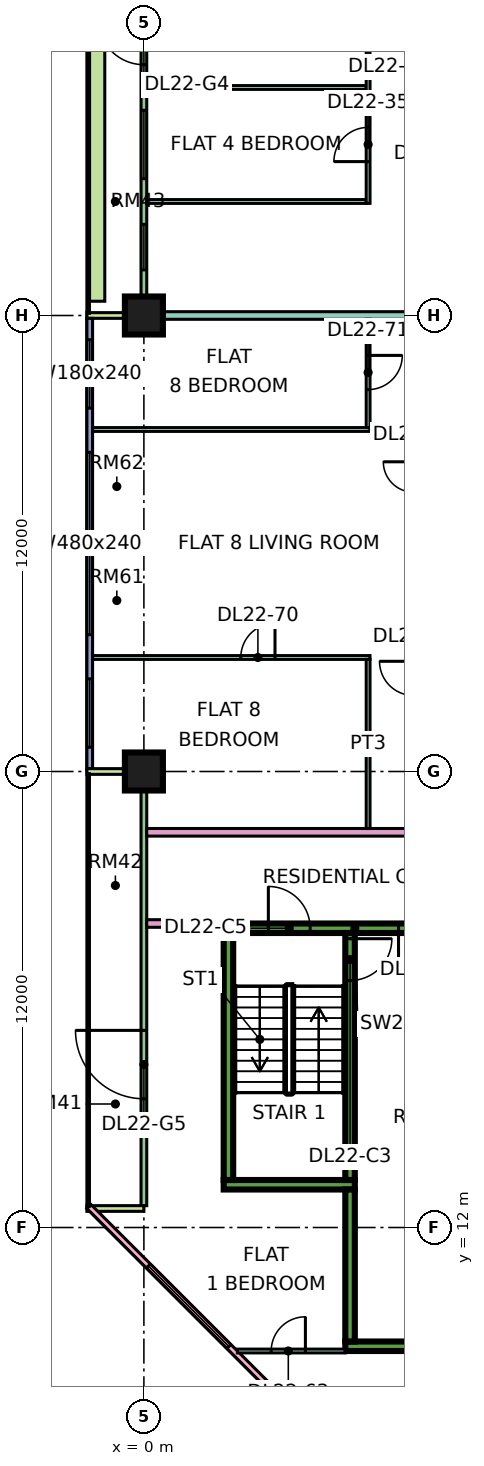
"""IFC4 building model, lengths in metres.
Left out: names, types, materials, properties, quantities, classifications, styles, units other than length and angle.
Written with IfcOpenShell. Run it as: python <this file> out.ifc"""

import sys

from ifc_helpers import new_model, si_unit, direction, frame, frame_2d, origin, origin_2d, place, context, subcontext, project, spatial, rectangle, extrude, element, fill, save


model = new_model("IFC4")
c1 = context("Model", 3, precision=1e-05, world=origin(), true_north=direction((0.0, 1.0)))
c2 = subcontext(c1, "Body", "Model", "MODEL_VIEW")
j1 = project(units=[si_unit("LENGTHUNIT", "METRE"), si_unit("PLANEANGLEUNIT", "RADIAN")], contexts=[c1])
p1 = place(None, origin())
s1 = spatial("IfcSite", under=j1, at=p1, CompositionType="ELEMENT")
p2 = place(p1, origin())
s2 = spatial("IfcBuilding", under=s1, at=p2, CompositionType="ELEMENT")
p3 = place(p2, frame((0.0, 0.0, 99.4)))
s3 = spatial("IfcBuildingStorey", under=s2, at=p3, CompositionType="ELEMENT", Elevation=99.4)
p4 = place(p3, frame((0.0, 24.0, 0.0), z_axis=(0.0, 0.0, 1.0), x_axis=(1.0, 0.0, 0.0)))
e1 = element("IfcColumn", 1, at=p4, inside=s3, PredefinedType="COLUMN", context=c2, shape_type="SweptSolid", body=[
    extrude(rectangle(XDim=1.0, YDim=1.0, at=origin_2d()), origin(), (0.0, 0.0, 1.0), 3.75),
])
p5 = place(p3, frame((0.0, 36.0, 0.0), z_axis=(0.0, 0.0, 1.0), x_axis=(1.0, 0.0, 0.0)))
e2 = element("IfcColumn", 2, at=p5, inside=s3, PredefinedType="COLUMN", context=c2, shape_type="SweptSolid", body=[
    extrude(rectangle(XDim=1.0, YDim=1.0, at=origin_2d()), origin(), (0.0, 0.0, 1.0), 3.75),
])
p6 = place(p3, frame((2.1, 19.875, 0.0), z_axis=(0.0, 0.0, 1.0), x_axis=(1.0, 0.0, 0.0)))
e3 = element("IfcWall", 3, at=p6, inside=s3, PredefinedType="SHEAR", context=c2, shape_type="SweptSolid", body=[
    extrude(rectangle(XDim=6.9, YDim=0.25, at=frame_2d((3.45, 0.0))), origin(), (0.0, 0.0, 1.0), 3.75),
])
p7 = place(p6, frame((1.175, 0.0, 0.0)))
e4 = element("IfcOpeningElement", 4, at=p7, cuts=e3, PredefinedType="OPENING", context=c2, shape_type="SweptSolid", body=[
    extrude(rectangle(XDim=1.1, YDim=2.2, at=frame_2d((0.55, 1.1))), frame((0.0, 0.135, 0.0), z_axis=(0.0, -1.0, 0.0), x_axis=(1.0, 0.0, 0.0)), (0.0, 0.0, 1.0), 0.27),
])
p8 = place(p6, frame((4.6, 0.0, 0.0)))
e5 = element("IfcOpeningElement", 5, at=p8, cuts=e3, PredefinedType="OPENING", context=c2, shape_type="SweptSolid", body=[
    extrude(rectangle(XDim=1.2, YDim=2.2, at=frame_2d((0.6, 1.1))), frame((0.0, 0.135, 0.0), z_axis=(0.0, -1.0, 0.0), x_axis=(1.0, 0.0, 0.0)), (0.0, 0.0, 1.0), 0.27),
])
p9 = place(p3, frame((2.1, 13.125, 0.0), z_axis=(0.0, 0.0, 1.0), x_axis=(1.0, 0.0, 0.0)))
e6 = element("IfcWall", 6, at=p9, inside=s3, PredefinedType="SHEAR", context=c2, shape_type="SweptSolid", body=[
    extrude(rectangle(XDim=3.45, YDim=0.25, at=frame_2d((1.725, 0.0))), origin(), (0.0, 0.0, 1.0), 3.75),
])
p10 = place(p3, frame((2.225, 13.25, 0.0), z_axis=(0.0, 0.0, 1.0), x_axis=(0.0, 1.0, 0.0)))
e7 = element("IfcWall", 7, at=p10, inside=s3, PredefinedType="SHEAR", context=c2, shape_type="SweptSolid", body=[
    extrude(rectangle(XDim=6.5, YDim=0.25, at=frame_2d((3.25, 0.0))), origin(), (0.0, 0.0, 1.0), 3.75),
])
p11 = place(p3, frame((5.425, 13.25, 0.0), z_axis=(0.0, 0.0, 1.0), x_axis=(0.0, 1.0, 0.0)))
e8 = element("IfcWall", 8, at=p11, inside=s3, PredefinedType="SHEAR", context=c2, shape_type="SweptSolid", body=[
    extrude(rectangle(XDim=6.5, YDim=0.25, at=frame_2d((3.25, 0.0))), origin(), (0.0, 0.0, 1.0), 3.75),
])
p12 = place(p11, frame((5.25, 0.0, 0.0)))
e9 = element("IfcOpeningElement", 9, at=p12, cuts=e8, PredefinedType="OPENING", context=c2, shape_type="SweptSolid", body=[
    extrude(rectangle(XDim=1.1, YDim=2.2, at=frame_2d((0.55, 1.1))), frame((0.0, 0.135, 0.0), z_axis=(0.0, -1.0, 0.0), x_axis=(1.0, 0.0, 0.0)), (0.0, 0.0, 1.0), 0.27),
])
p13 = place(p3, frame((5.3, 8.875, 0.0), z_axis=(0.0, 0.0, 1.0), x_axis=(1.0, 0.0, 0.0)))
e10 = element("IfcWall", 10, at=p13, inside=s3, PredefinedType="SHEAR", context=c2, shape_type="SweptSolid", body=[
    extrude(rectangle(XDim=3.7, YDim=0.25, at=frame_2d((1.85, 0.0))), origin(), (0.0, 0.0, 1.0), 3.75),
])
p14 = place(p3, frame((5.425, 9.0, 0.0), z_axis=(0.0, 0.0, 1.0), x_axis=(0.0, 1.0, 0.0)))
e11 = element("IfcWall", 11, at=p14, inside=s3, PredefinedType="SHEAR", context=c2, shape_type="SweptSolid", body=[
    extrude(rectangle(XDim=4.0, YDim=0.25, at=frame_2d((2.0, 0.0))), origin(), (0.0, 0.0, 1.0), 3.75),
])
p15 = place(p3, frame((0.0, 47.925, 0.0), z_axis=(0.0, 0.0, 1.0), x_axis=(0.0, -1.0, 0.0)))
e12 = element("IfcWall", 12, at=p15, inside=s3, PredefinedType="SOLIDWALL", context=c2, shape_type="SweptSolid", body=[
    extrude(rectangle(XDim=11.85, YDim=0.15, at=frame_2d((5.925, 0.0))), origin(), (0.0, 0.0, 1.0), 3.35),
])
p16 = place(p15, frame((0.562, 0.0, 0.45)))
e13 = element("IfcOpeningElement", 13, at=p16, cuts=e12, PredefinedType="OPENING", context=c2, shape_type="SweptSolid", body=[
    extrude(rectangle(XDim=1.2, YDim=2.4, at=frame_2d((0.6, 1.2))), frame((0.0, 0.085, 0.0), z_axis=(0.0, -1.0, 0.0), x_axis=(1.0, 0.0, 0.0)), (0.0, 0.0, 1.0), 0.17),
])
p17 = place(p15, frame((4.125, 0.0, 0.0)))
e14 = element("IfcOpeningElement", 14, at=p17, cuts=e12, PredefinedType="OPENING", context=c2, shape_type="SweptSolid", body=[
    extrude(rectangle(XDim=1.2, YDim=2.4, at=frame_2d((0.6, 1.2))), frame((0.0, 0.085, 0.0), z_axis=(0.0, -1.0, 0.0), x_axis=(1.0, 0.0, 0.0)), (0.0, 0.0, 1.0), 0.17),
])
p18 = place(p15, frame((6.525, 0.0, 0.45)))
e15 = element("IfcOpeningElement", 15, at=p18, cuts=e12, PredefinedType="OPENING", context=c2, shape_type="SweptSolid", body=[
    extrude(rectangle(XDim=1.8, YDim=2.4, at=frame_2d((0.9, 1.2))), frame((0.0, 0.085, 0.0), z_axis=(0.0, -1.0, 0.0), x_axis=(1.0, 0.0, 0.0)), (0.0, 0.0, 1.0), 0.17),
])
p19 = place(p15, frame((9.525, 0.0, 0.45)))
e16 = element("IfcOpeningElement", 16, at=p19, cuts=e12, PredefinedType="OPENING", context=c2, shape_type="SweptSolid", body=[
    extrude(rectangle(XDim=1.2, YDim=2.4, at=frame_2d((0.6, 1.2))), frame((0.0, 0.085, 0.0), z_axis=(0.0, -1.0, 0.0), x_axis=(1.0, 0.0, 0.0)), (0.0, 0.0, 1.0), 0.17),
])
p20 = place(p3, frame((-1.5, 36.0, 0.0), z_axis=(0.0, 0.0, 1.0), x_axis=(1.0, 0.0, 0.0)))
e17 = element("IfcWall", 17, at=p20, inside=s3, PredefinedType="SOLIDWALL", context=c2, shape_type="SweptSolid", body=[
    extrude(rectangle(XDim=1.5, YDim=0.15, at=frame_2d((0.75, 0.0))), origin(), (0.0, 0.0, 1.0), 3.35),
])
p21 = place(p3, frame((-1.425, 35.925, 0.0), z_axis=(0.0, 0.0, 1.0), x_axis=(0.0, -1.0, 0.0)))
e18 = element("IfcWall", 18, at=p21, inside=s3, PredefinedType="SOLIDWALL", context=c2, shape_type="SweptSolid", body=[
    extrude(rectangle(XDim=11.85, YDim=0.15, at=frame_2d((5.925, 0.0))), origin(), (0.0, 0.0, 1.0), 3.35),
])
p22 = place(p21, frame((0.562, 0.0, 0.45)))
e19 = element("IfcOpeningElement", 19, at=p22, cuts=e18, PredefinedType="OPENING", context=c2, shape_type="SweptSolid", body=[
    extrude(rectangle(XDim=1.8, YDim=2.4, at=frame_2d((0.9, 1.2))), frame((0.0, 0.085, 0.0), z_axis=(0.0, -1.0, 0.0), x_axis=(1.0, 0.0, 0.0)), (0.0, 0.0, 1.0), 0.17),
])
p23 = place(p21, frame((3.525, 0.0, 0.45)))
e20 = element("IfcOpeningElement", 20, at=p23, cuts=e18, PredefinedType="OPENING", context=c2, shape_type="SweptSolid", body=[
    extrude(rectangle(XDim=4.8, YDim=2.4, at=frame_2d((2.4, 1.2))), frame((0.0, 0.085, 0.0), z_axis=(0.0, -1.0, 0.0), x_axis=(1.0, 0.0, 0.0)), (0.0, 0.0, 1.0), 0.17),
])
p24 = place(p21, frame((9.488, 0.0, 0.45)))
e21 = element("IfcOpeningElement", 21, at=p24, cuts=e18, PredefinedType="OPENING", context=c2, shape_type="SweptSolid", body=[
    extrude(rectangle(XDim=1.8, YDim=2.4, at=frame_2d((0.9, 1.2))), frame((0.0, 0.085, 0.0), z_axis=(0.0, -1.0, 0.0), x_axis=(1.0, 0.0, 0.0)), (0.0, 0.0, 1.0), 0.17),
])
p25 = place(p3, frame((0.0, 23.925, 0.0), z_axis=(0.0, 0.0, 1.0), x_axis=(0.0, -1.0, 0.0)))
e22 = element("IfcWall", 22, at=p25, inside=s3, PredefinedType="SOLIDWALL", context=c2, shape_type="SweptSolid", body=[
    extrude(rectangle(XDim=11.35, YDim=0.15, at=frame_2d((5.675, 0.0))), origin(), (0.0, 0.0, 1.0), 3.35),
])
p26 = place(p25, frame((6.738, 0.0, 0.0)))
e23 = element("IfcOpeningElement", 23, at=p26, cuts=e22, PredefinedType="OPENING", context=c2, shape_type="SweptSolid", body=[
    extrude(rectangle(XDim=1.8, YDim=2.4, at=frame_2d((0.9, 1.2))), frame((0.0, 0.085, 0.0), z_axis=(0.0, -1.0, 0.0), x_axis=(1.0, 0.0, 0.0)), (0.0, 0.0, 1.0), 0.17),
])
for number, where, z_axis, x_axis in (
    (24, (-1.5, 24.0, 0.0), (0.0, 0.0, 1.0), (1.0, 0.0, 0.0)),
    (25, (-1.5, 12.5, 0.0), (0.0, 0.0, 1.0), (1.0, 0.0, 0.0)),
):
    element("IfcWall", number, at=place(p3, frame(where, z_axis=z_axis, x_axis=x_axis)), inside=s3, PredefinedType="SOLIDWALL", context=c2, shape_type="SweptSolid", body=[
        extrude(rectangle(XDim=1.5, YDim=0.15, at=frame_2d((0.75, 0.0))), origin(), (0.0, 0.0, 1.0), 3.35),
    ])
p27 = place(p3, frame((-1.447, 12.553, 0.0), z_axis=(0.0, 0.0, 1.0), x_axis=(0.707106781187, -0.707106781187, 0.0)))
e26 = element("IfcWall", 26, at=p27, inside=s3, PredefinedType="SOLIDWALL", context=c2, shape_type="SweptSolid", body=[
    extrude(rectangle(XDim=19.799, YDim=0.15, at=frame_2d((9.899, 0.0))), origin(), (0.0, 0.0, 1.0), 3.35),
])
p28 = place(p27, frame((2.212, 0.0, 0.45)))
e27 = element("IfcOpeningElement", 27, at=p28, cuts=e26, PredefinedType="OPENING", context=c2, shape_type="SweptSolid", body=[
    extrude(rectangle(XDim=3.0, YDim=2.4, at=frame_2d((1.5, 1.2))), frame((0.0, 0.085, 0.0), z_axis=(0.0, -1.0, 0.0), x_axis=(1.0, 0.0, 0.0)), (0.0, 0.0, 1.0), 0.17),
])
p29 = place(p27, frame((10.216, 0.0, 0.45)))
e28 = element("IfcOpeningElement", 28, at=p29, cuts=e26, PredefinedType="OPENING", context=c2, shape_type="SweptSolid", body=[
    extrude(rectangle(XDim=3.0, YDim=2.4, at=frame_2d((1.5, 1.2))), frame((0.0, 0.085, 0.0), z_axis=(0.0, -1.0, 0.0), x_axis=(1.0, 0.0, 0.0)), (0.0, 0.0, 1.0), 0.17),
])
p30 = place(p3, frame((-1.229, 47.625, 0.0), z_axis=(0.0, 0.0, 1.0), x_axis=(0.0, -1.0, 0.0)))
e29 = element("IfcWall", 29, at=p30, inside=s3, PredefinedType="SOLIDWALL", context=c2, shape_type="SweptSolid", body=[
    extrude(rectangle(XDim=11.25, YDim=0.4, at=frame_2d((5.625, 0.0))), origin(), (0.0, 0.0, 1.0), 0.7),
])
p31 = place(p3, frame((-1.35, 27.0, 0.0), z_axis=(0.0, 0.0, 1.0), x_axis=(1.0, 0.0, 0.0)))
e30 = element("IfcWall", 30, at=p31, inside=s3, PredefinedType="PARTITIONING", context=c2, shape_type="SweptSolid", body=[
    extrude(rectangle(XDim=7.3, YDim=0.1, at=frame_2d((3.65, 0.0))), origin(), (0.0, 0.0, 1.0), 3.35),
])
p32 = place(p31, frame((3.9, 0.0, 0.0)))
e31 = element("IfcOpeningElement", 31, at=p32, cuts=e30, PredefinedType="OPENING", context=c2, shape_type="SweptSolid", body=[
    extrude(rectangle(XDim=0.9, YDim=2.1, at=frame_2d((0.45, 1.05))), frame((0.0, 0.06, 0.0), z_axis=(0.0, -1.0, 0.0), x_axis=(1.0, 0.0, 0.0)), (0.0, 0.0, 1.0), 0.12),
])
p33 = place(p3, frame((-1.35, 33.0, 0.0), z_axis=(0.0, 0.0, 1.0), x_axis=(1.0, 0.0, 0.0)))
e32 = element("IfcWall", 32, at=p33, inside=s3, PredefinedType="PARTITIONING", context=c2, shape_type="SweptSolid", body=[
    extrude(rectangle(XDim=7.3, YDim=0.1, at=frame_2d((3.65, 0.0))), origin(), (0.0, 0.0, 1.0), 3.35),
])
e33 = element("IfcWall", 33, at=p5, inside=s3, PredefinedType="PARTITIONING", context=c2, shape_type="SweptSolid", body=[
    extrude(rectangle(XDim=12.4, YDim=0.2, at=frame_2d((6.2, 0.0))), origin(), (0.0, 0.0, 1.0), 3.35),
])
p34 = place(p3, frame((0.074, 20.0, 0.0), z_axis=(0.0, 0.0, 1.0), x_axis=(1.0, 0.0, 0.0)))
e34 = element("IfcWall", 34, at=p34, inside=s3, PredefinedType="PARTITIONING", context=c2, shape_type="SweptSolid", body=[
    extrude(rectangle(XDim=2.026, YDim=0.2, at=frame_2d((1.013, 0.0))), origin(), (0.0, 0.0, 1.0), 3.35),
])
p35 = place(p3, frame((0.074, 22.4, 0.0), z_axis=(0.0, 0.0, 1.0), x_axis=(1.0, 0.0, 0.0)))
e35 = element("IfcWall", 35, at=p35, inside=s3, PredefinedType="PARTITIONING", context=c2, shape_type="SweptSolid", body=[
    extrude(rectangle(XDim=12.326, YDim=0.2, at=frame_2d((6.163, 0.0))), origin(), (0.0, 0.0, 1.0), 3.35),
])
for number, where, z_axis, x_axis in (
    (36, (0.074, 39.0, 0.0), (0.0, 0.0, 1.0), (1.0, 0.0, 0.0)),
    (37, (0.074, 42.0, 0.0), (0.0, 0.0, 1.0), (1.0, 0.0, 0.0)),
):
    element("IfcWall", number, at=place(p3, frame(where, z_axis=z_axis, x_axis=x_axis)), inside=s3, PredefinedType="PARTITIONING", context=c2, shape_type="SweptSolid", body=[
        extrude(rectangle(XDim=5.776, YDim=0.1, at=frame_2d((2.888, 0.0))), origin(), (0.0, 0.0, 1.0), 3.35),
    ])
p36 = place(p3, frame((2.461, 8.75, 0.0), z_axis=(0.0, 0.0, 1.0), x_axis=(1.0, 0.0, 0.0)))
e38 = element("IfcWall", 38, at=p36, inside=s3, PredefinedType="PARTITIONING", context=c2, shape_type="SweptSolid", body=[
    extrude(rectangle(XDim=2.839, YDim=0.1, at=frame_2d((1.419, 0.0))), origin(), (0.0, 0.0, 1.0), 3.35),
])
p37 = place(p36, frame((0.889, 0.0, 0.0)))
e39 = element("IfcOpeningElement", 39, at=p37, cuts=e38, PredefinedType="OPENING", context=c2, shape_type="SweptSolid", body=[
    extrude(rectangle(XDim=0.9, YDim=2.1, at=frame_2d((0.45, 1.05))), frame((0.0, 0.06, 0.0), z_axis=(0.0, -1.0, 0.0), x_axis=(1.0, 0.0, 0.0)), (0.0, 0.0, 1.0), 0.12),
])
p38 = place(p3, frame((5.9, 22.5, 0.0), z_axis=(0.0, 0.0, 1.0), x_axis=(0.0, 1.0, 0.0)))
e40 = element("IfcWall", 40, at=p38, inside=s3, PredefinedType="PARTITIONING", context=c2, shape_type="SweptSolid", body=[
    extrude(rectangle(XDim=4.45, YDim=0.1, at=frame_2d((2.225, 0.0))), origin(), (0.0, 0.0, 1.0), 3.35),
])
p39 = place(p3, frame((5.9, 33.05, 0.0), z_axis=(0.0, 0.0, 1.0), x_axis=(0.0, 1.0, 0.0)))
e41 = element("IfcWall", 41, at=p39, inside=s3, PredefinedType="PARTITIONING", context=c2, shape_type="SweptSolid", body=[
    extrude(rectangle(XDim=2.85, YDim=0.1, at=frame_2d((1.425, 0.0))), origin(), (0.0, 0.0, 1.0), 3.35),
])
p40 = place(p39, frame((1.0, 0.0, 0.0)))
e42 = element("IfcOpeningElement", 42, at=p40, cuts=e41, PredefinedType="OPENING", context=c2, shape_type="SweptSolid", body=[
    extrude(rectangle(XDim=0.9, YDim=2.1, at=frame_2d((0.45, 1.05))), frame((0.0, 0.06, 0.0), z_axis=(0.0, -1.0, 0.0), x_axis=(1.0, 0.0, 0.0)), (0.0, 0.0, 1.0), 0.12),
])
p41 = place(p3, frame((5.9, 38.95, 0.0), z_axis=(0.0, 0.0, 1.0), x_axis=(0.0, 1.0, 0.0)))
e43 = element("IfcWall", 43, at=p41, inside=s3, PredefinedType="PARTITIONING", context=c2, shape_type="SweptSolid", body=[
    extrude(rectangle(XDim=11.95, YDim=0.1, at=frame_2d((5.975, 0.0))), origin(), (0.0, 0.0, 1.0), 3.35),
])
p42 = place(p41, frame((1.1, 0.0, 0.0)))
e44 = element("IfcOpeningElement", 44, at=p42, cuts=e43, PredefinedType="OPENING", context=c2, shape_type="SweptSolid", body=[
    extrude(rectangle(XDim=0.9, YDim=2.1, at=frame_2d((0.45, 1.05))), frame((0.0, 0.06, 0.0), z_axis=(0.0, -1.0, 0.0), x_axis=(1.0, 0.0, 0.0)), (0.0, 0.0, 1.0), 0.12),
])
p43 = place(p41, frame((4.1, 0.0, 0.0)))
e45 = element("IfcOpeningElement", 45, at=p43, cuts=e43, PredefinedType="OPENING", context=c2, shape_type="SweptSolid", body=[
    extrude(rectangle(XDim=0.9, YDim=2.1, at=frame_2d((0.45, 1.05))), frame((0.0, 0.06, 0.0), z_axis=(0.0, -1.0, 0.0), x_axis=(1.0, 0.0, 0.0)), (0.0, 0.0, 1.0), 0.12),
])
p44 = place(p41, frame((7.1, 0.0, 0.0)))
e46 = element("IfcOpeningElement", 46, at=p44, cuts=e43, PredefinedType="OPENING", context=c2, shape_type="SweptSolid", body=[
    extrude(rectangle(XDim=0.9, YDim=2.1, at=frame_2d((0.45, 1.05))), frame((0.0, 0.06, 0.0), z_axis=(0.0, -1.0, 0.0), x_axis=(1.0, 0.0, 0.0)), (0.0, 0.0, 1.0), 0.12),
])
p45 = place(p41, frame((10.1, 0.0, 0.0)))
e47 = element("IfcOpeningElement", 47, at=p45, cuts=e43, PredefinedType="OPENING", context=c2, shape_type="SweptSolid", body=[
    extrude(rectangle(XDim=0.9, YDim=2.1, at=frame_2d((0.45, 1.05))), frame((0.0, 0.06, 0.0), z_axis=(0.0, -1.0, 0.0), x_axis=(1.0, 0.0, 0.0)), (0.0, 0.0, 1.0), 0.12),
])
p46 = place(p17, frame((1.2, 0.0, 0.0), z_axis=(0.0, 0.0, 1.0), x_axis=(-1.0, 0.0, 0.0)))
e48 = element("IfcDoor", 48, at=p46, inside=s3, OperationType="DOUBLE_DOOR_SINGLE_SWING", PredefinedType="DOOR", context=c2, shape_type="SweptSolid", body=[
    extrude(rectangle(XDim=1.2, YDim=2.4, at=frame_2d((0.6, 1.2))), frame((0.0, 0.025, 0.0), z_axis=(0.0, -1.0, 0.0), x_axis=(1.0, 0.0, 0.0)), (0.0, 0.0, 1.0), 0.05),
])
fill(e14, e48)
p47 = place(p18, origin())
e49 = element("IfcWindow", 49, at=p47, inside=s3, PartitioningType="SINGLE_PANEL", PredefinedType="WINDOW", context=c2, shape_type="SweptSolid", body=[
    extrude(rectangle(XDim=1.8, YDim=2.4, at=frame_2d((0.9, 1.2))), frame((0.0, 0.03, 0.0), z_axis=(0.0, -1.0, 0.0), x_axis=(1.0, 0.0, 0.0)), (0.0, 0.0, 1.0), 0.06),
])
fill(e15, e49)
p48 = place(p19, origin())
e50 = element("IfcWindow", 50, at=p48, inside=s3, PartitioningType="SINGLE_PANEL", PredefinedType="WINDOW", context=c2, shape_type="SweptSolid", body=[
    extrude(rectangle(XDim=1.2, YDim=2.4, at=frame_2d((0.6, 1.2))), frame((0.0, 0.03, 0.0), z_axis=(0.0, -1.0, 0.0), x_axis=(1.0, 0.0, 0.0)), (0.0, 0.0, 1.0), 0.06),
])
fill(e16, e50)
p49 = place(p22, origin())
e51 = element("IfcWindow", 51, at=p49, inside=s3, PartitioningType="SINGLE_PANEL", PredefinedType="WINDOW", context=c2, shape_type="SweptSolid", body=[
    extrude(rectangle(XDim=1.8, YDim=2.4, at=frame_2d((0.9, 1.2))), frame((0.0, 0.03, 0.0), z_axis=(0.0, -1.0, 0.0), x_axis=(1.0, 0.0, 0.0)), (0.0, 0.0, 1.0), 0.06),
])
fill(e19, e51)
p50 = place(p23, origin())
e52 = element("IfcWindow", 52, at=p50, inside=s3, PartitioningType="SINGLE_PANEL", PredefinedType="WINDOW", context=c2, shape_type="SweptSolid", body=[
    extrude(rectangle(XDim=4.8, YDim=2.4, at=frame_2d((2.4, 1.2))), frame((0.0, 0.03, 0.0), z_axis=(0.0, -1.0, 0.0), x_axis=(1.0, 0.0, 0.0)), (0.0, 0.0, 1.0), 0.06),
])
fill(e20, e52)
p51 = place(p24, origin())
e53 = element("IfcWindow", 53, at=p51, inside=s3, PartitioningType="SINGLE_PANEL", PredefinedType="WINDOW", context=c2, shape_type="SweptSolid", body=[
    extrude(rectangle(XDim=1.8, YDim=2.4, at=frame_2d((0.9, 1.2))), frame((0.0, 0.03, 0.0), z_axis=(0.0, -1.0, 0.0), x_axis=(1.0, 0.0, 0.0)), (0.0, 0.0, 1.0), 0.06),
])
fill(e21, e53)
p52 = place(p26, frame((1.8, 0.0, 0.0), z_axis=(0.0, 0.0, 1.0), x_axis=(-1.0, 0.0, 0.0)))
e54 = element("IfcDoor", 54, at=p52, inside=s3, OperationType="DOUBLE_DOOR_SINGLE_SWING", PredefinedType="DOOR", context=c2, shape_type="SweptSolid", body=[
    extrude(rectangle(XDim=1.8, YDim=2.4, at=frame_2d((0.9, 1.2))), frame((0.0, 0.025, 0.0), z_axis=(0.0, -1.0, 0.0), x_axis=(1.0, 0.0, 0.0)), (0.0, 0.0, 1.0), 0.05),
])
fill(e23, e54)
p53 = place(p28, origin())
e55 = element("IfcWindow", 55, at=p53, inside=s3, PartitioningType="SINGLE_PANEL", PredefinedType="WINDOW", context=c2, shape_type="SweptSolid", body=[
    extrude(rectangle(XDim=3.0, YDim=2.4, at=frame_2d((1.5, 1.2))), frame((0.0, 0.03, 0.0), z_axis=(0.0, -1.0, 0.0), x_axis=(1.0, 0.0, 0.0)), (0.0, 0.0, 1.0), 0.06),
])
fill(e27, e55)
p54 = place(p12, origin())
e56 = element("IfcDoor", 56, at=p54, inside=s3, OperationType="SINGLE_SWING_RIGHT", PredefinedType="DOOR", context=c2, shape_type="SweptSolid", body=[
    extrude(rectangle(XDim=1.1, YDim=2.2, at=frame_2d((0.55, 1.1))), frame((0.0, 0.025, 0.0), z_axis=(0.0, -1.0, 0.0), x_axis=(1.0, 0.0, 0.0)), (0.0, 0.0, 1.0), 0.05),
])
fill(e9, e56)
p55 = place(p7, origin())
e57 = element("IfcDoor", 57, at=p55, inside=s3, OperationType="SINGLE_SWING_LEFT", PredefinedType="DOOR", context=c2, shape_type="SweptSolid", body=[
    extrude(rectangle(XDim=1.1, YDim=2.2, at=frame_2d((0.55, 1.1))), frame((0.0, 0.025, 0.0), z_axis=(0.0, -1.0, 0.0), x_axis=(1.0, 0.0, 0.0)), (0.0, 0.0, 1.0), 0.05),
])
fill(e4, e57)
p56 = place(p8, frame((1.2, 0.0, 0.0), z_axis=(0.0, 0.0, 1.0), x_axis=(-1.0, 0.0, 0.0)))
e58 = element("IfcDoor", 58, at=p56, inside=s3, OperationType="SINGLE_SWING_LEFT", PredefinedType="DOOR", context=c2, shape_type="SweptSolid", body=[
    extrude(rectangle(XDim=1.2, YDim=2.2, at=frame_2d((0.6, 1.1))), frame((0.0, 0.025, 0.0), z_axis=(0.0, -1.0, 0.0), x_axis=(1.0, 0.0, 0.0)), (0.0, 0.0, 1.0), 0.05),
])
fill(e5, e58)
p57 = place(p42, origin())
e59 = element("IfcDoor", 59, at=p57, inside=s3, OperationType="SINGLE_SWING_LEFT", PredefinedType="DOOR", context=c2, shape_type="SweptSolid", body=[
    extrude(rectangle(XDim=0.9, YDim=2.1, at=frame_2d((0.45, 1.05))), frame((0.0, 0.025, 0.0), z_axis=(0.0, -1.0, 0.0), x_axis=(1.0, 0.0, 0.0)), (0.0, 0.0, 1.0), 0.05),
])
fill(e44, e59)
p58 = place(p37, frame((0.9, 0.0, 0.0), z_axis=(0.0, 0.0, 1.0), x_axis=(-1.0, 0.0, 0.0)))
e60 = element("IfcDoor", 60, at=p58, inside=s3, OperationType="SINGLE_SWING_RIGHT", PredefinedType="DOOR", context=c2, shape_type="SweptSolid", body=[
    extrude(rectangle(XDim=0.9, YDim=2.1, at=frame_2d((0.45, 1.05))), frame((0.0, 0.025, 0.0), z_axis=(0.0, -1.0, 0.0), x_axis=(1.0, 0.0, 0.0)), (0.0, 0.0, 1.0), 0.05),
])
fill(e39, e60)
p59 = place(p32, frame((0.9, 0.0, 0.0), z_axis=(0.0, 0.0, 1.0), x_axis=(-1.0, 0.0, 0.0)))
e61 = element("IfcDoor", 61, at=p59, inside=s3, OperationType="SINGLE_SWING_RIGHT", PredefinedType="DOOR", context=c2, shape_type="SweptSolid", body=[
    extrude(rectangle(XDim=0.9, YDim=2.1, at=frame_2d((0.45, 1.05))), frame((0.0, 0.025, 0.0), z_axis=(0.0, -1.0, 0.0), x_axis=(1.0, 0.0, 0.0)), (0.0, 0.0, 1.0), 0.05),
])
fill(e31, e61)
p60 = place(p40, origin())
e62 = element("IfcDoor", 62, at=p60, inside=s3, OperationType="SINGLE_SWING_RIGHT", PredefinedType="DOOR", context=c2, shape_type="SweptSolid", body=[
    extrude(rectangle(XDim=0.9, YDim=2.1, at=frame_2d((0.45, 1.05))), frame((0.0, 0.025, 0.0), z_axis=(0.0, -1.0, 0.0), x_axis=(1.0, 0.0, 0.0)), (0.0, 0.0, 1.0), 0.05),
])
fill(e42, e62)
save(model, sys.argv[1])
